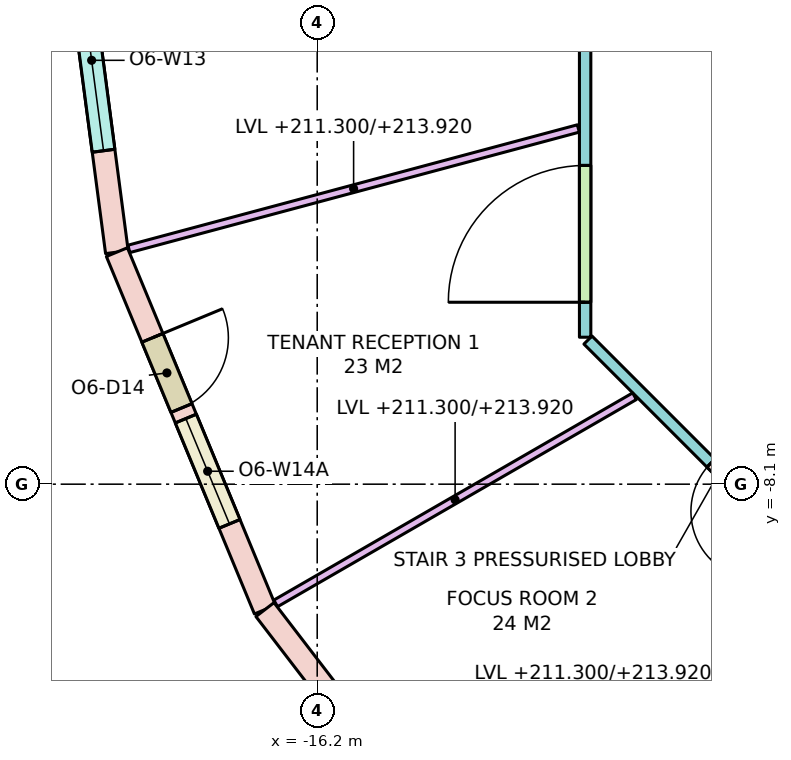
"""IFC4 building model, lengths in metres.
Left out: names, types, materials, properties, quantities, classifications, styles, units other than length and angle.
Written with IfcOpenShell. Run it as: python <this file> out.ifc"""

import sys

from ifc_helpers import new_model, si_unit, direction, frame, frame_2d, origin, place, context, subcontext, project, spatial, rectangle, extrude, element, fill, save


model = new_model("IFC4")
c1 = context("Model", 3, precision=1e-05, world=origin(), true_north=direction((0.0, 1.0)))
c2 = subcontext(c1, "Body", "Model", "MODEL_VIEW")
j1 = project(units=[si_unit("LENGTHUNIT", "METRE"), si_unit("PLANEANGLEUNIT", "RADIAN")], contexts=[c1])
p1 = place(None, origin())
s1 = spatial("IfcSite", under=j1, at=p1, CompositionType="ELEMENT")
p2 = place(p1, origin())
s2 = spatial("IfcBuilding", under=s1, at=p2, CompositionType="ELEMENT")
p3 = place(p2, frame((0.0, 0.0, 211.3)))
s3 = spatial("IfcBuildingStorey", under=s2, at=p3, CompositionType="ELEMENT", Elevation=211.3)
p4 = place(p3, frame((-19.5, 0.0, 0.0), z_axis=(0.0, 0.0, 1.0), x_axis=(0.130495451964, -0.99144890792, 0.0)))
e1 = element("IfcWall", 1, at=p4, inside=s3, PredefinedType="STANDARD", context=c2, shape_type="SweptSolid", body=[
    extrude(rectangle(XDim=5.091, YDim=0.3, at=frame_2d((2.545, 0.0))), origin(), (0.0, 0.0, 1.0), 3.42),
])
p5 = place(p4, frame((1.345, 0.0, 0.8)))
e2 = element("IfcOpeningElement", 2, at=p5, cuts=e1, PredefinedType="OPENING", context=c2, shape_type="SweptSolid", body=[
    extrude(rectangle(XDim=2.4, YDim=2.4, at=frame_2d((1.2, 1.2))), frame((0.0, 0.16, 0.0), z_axis=(0.0, -1.0, 0.0), x_axis=(1.0, 0.0, 0.0)), (0.0, 0.0, 1.0), 0.32),
])
p6 = place(p3, frame((-18.836, -5.047, 0.0), z_axis=(0.0, 0.0, 1.0), x_axis=(0.382724538613, -0.923862504675, 0.0)))
e3 = element("IfcWall", 3, at=p6, inside=s3, PredefinedType="STANDARD", context=c2, shape_type="SweptSolid", body=[
    extrude(rectangle(XDim=5.091, YDim=0.3, at=frame_2d((2.545, 0.0))), origin(), (0.0, 0.0, 1.0), 3.42),
])
p7 = place(p6, frame((1.22, 0.0, 0.0)))
e4 = element("IfcOpeningElement", 4, at=p7, cuts=e3, PredefinedType="OPENING", context=c2, shape_type="SweptSolid", body=[
    extrude(rectangle(XDim=1.0, YDim=2.4, at=frame_2d((0.5, 1.2))), frame((0.0, 0.16, 0.0), z_axis=(0.0, -1.0, 0.0), x_axis=(1.0, 0.0, 0.0)), (0.0, 0.0, 1.0), 0.32),
])
p8 = place(p6, frame((2.37, 0.0, 0.8)))
e5 = element("IfcOpeningElement", 5, at=p8, cuts=e3, PredefinedType="OPENING", context=c2, shape_type="SweptSolid", body=[
    extrude(rectangle(XDim=1.5, YDim=2.4, at=frame_2d((0.75, 1.2))), frame((0.0, 0.16, 0.0), z_axis=(0.0, -1.0, 0.0), x_axis=(1.0, 0.0, 0.0)), (0.0, 0.0, 1.0), 0.32),
])
p9 = place(p3, frame((-16.887, -9.75, 0.0), z_axis=(0.0, 0.0, 1.0), x_axis=(0.608757714995, -0.79335619014, 0.0)))
e6 = element("IfcWall", 6, at=p9, inside=s3, PredefinedType="STANDARD", context=c2, shape_type="SweptSolid", body=[
    extrude(rectangle(XDim=5.091, YDim=0.3, at=frame_2d((2.545, 0.0))), origin(), (0.0, 0.0, 1.0), 3.42),
])
p10 = place(p9, frame((1.345, 0.0, 0.8)))
e7 = element("IfcOpeningElement", 7, at=p10, cuts=e6, PredefinedType="OPENING", context=c2, shape_type="SweptSolid", body=[
    extrude(rectangle(XDim=2.4, YDim=2.4, at=frame_2d((1.2, 1.2))), frame((0.0, 0.16, 0.0), z_axis=(0.0, -1.0, 0.0), x_axis=(1.0, 0.0, 0.0)), (0.0, 0.0, 1.0), 0.32),
])
p11 = place(p3, frame((-9.421, -9.421, 0.0), z_axis=(0.0, 0.0, 1.0), x_axis=(-0.707079950597, 0.707133610758, 0.0)))
e8 = element("IfcWall", 8, at=p11, inside=s3, PredefinedType="PARTITIONING", context=c2, shape_type="SweptSolid", body=[
    extrude(rectangle(XDim=4.55, YDim=0.15, at=frame_2d((2.275, 0.0))), origin(), (0.0, 0.0, 1.0), 2.62),
])
p12 = place(p11, frame((1.361, 0.0, 0.0)))
e9 = element("IfcOpeningElement", 9, at=p12, cuts=e8, PredefinedType="OPENING", context=c2, shape_type="SweptSolid", body=[
    extrude(rectangle(XDim=0.9, YDim=2.1, at=frame_2d((0.45, 1.05))), frame((0.0, 0.085, 0.0), z_axis=(0.0, -1.0, 0.0), x_axis=(1.0, 0.0, 0.0)), (0.0, 0.0, 1.0), 0.17),
])
p13 = place(p3, frame((-12.675, -6.167, 0.0), z_axis=(0.0, 0.0, 1.0), x_axis=(0.0, 1.0, 0.0)))
e10 = element("IfcWall", 10, at=p13, inside=s3, PredefinedType="PARTITIONING", context=c2, shape_type="SweptSolid", body=[
    extrude(rectangle(XDim=12.333, YDim=0.15, at=frame_2d((6.167, 0.0))), origin(), (0.0, 0.0, 1.0), 2.62),
])
p14 = place(p13, frame((10.473, 0.0, 0.0)))
e11 = element("IfcOpeningElement", 11, at=p14, cuts=e10, PredefinedType="OPENING", context=c2, shape_type="SweptSolid", body=[
    extrude(rectangle(XDim=0.9, YDim=2.1, at=frame_2d((0.45, 1.05))), frame((0.0, 0.085, 0.0), z_axis=(0.0, -1.0, 0.0), x_axis=(1.0, 0.0, 0.0)), (0.0, 0.0, 1.0), 0.17),
])
p15 = place(p13, frame((7.416, 0.0, 0.0)))
e12 = element("IfcOpeningElement", 12, at=p15, cuts=e10, PredefinedType="OPENING", context=c2, shape_type="SweptSolid", body=[
    extrude(rectangle(XDim=0.9, YDim=2.1, at=frame_2d((0.45, 1.05))), frame((0.0, 0.085, 0.0), z_axis=(0.0, -1.0, 0.0), x_axis=(1.0, 0.0, 0.0)), (0.0, 0.0, 1.0), 0.17),
])
p16 = place(p13, frame((4.018, 0.0, 0.0)))
e13 = element("IfcOpeningElement", 13, at=p16, cuts=e10, PredefinedType="OPENING", context=c2, shape_type="SweptSolid", body=[
    extrude(rectangle(XDim=0.9, YDim=2.1, at=frame_2d((0.45, 1.05))), frame((0.0, 0.085, 0.0), z_axis=(0.0, -1.0, 0.0), x_axis=(1.0, 0.0, 0.0)), (0.0, 0.0, 1.0), 0.17),
])
p17 = place(p13, frame((0.46, 0.0, 0.0)))
e14 = element("IfcOpeningElement", 14, at=p17, cuts=e10, PredefinedType="OPENING", context=c2, shape_type="SweptSolid", body=[
    extrude(rectangle(XDim=1.8, YDim=2.1, at=frame_2d((0.9, 1.05))), frame((0.0, 0.085, 0.0), z_axis=(0.0, -1.0, 0.0), x_axis=(1.0, 0.0, 0.0)), (0.0, 0.0, 1.0), 0.17),
])
p18 = place(p3, frame((-12.764, -3.42, 0.0), z_axis=(0.0, 0.0, 1.0), x_axis=(-0.965925800266, -0.258819142221, 0.0)))
e15 = element("IfcWall", 15, at=p18, inside=s3, PredefinedType="PARTITIONING", context=c2, shape_type="SweptSolid", body=[
    extrude(rectangle(XDim=6.122, YDim=0.1, at=frame_2d((3.061, 0.0))), origin(), (0.0, 0.0, 1.0), 2.62),
])
p19 = place(p3, frame((-12.025, -6.943, 0.0), z_axis=(0.0, 0.0, 1.0), x_axis=(-0.866029712004, -0.499992537871, 0.0)))
e16 = element("IfcWall", 16, at=p19, inside=s3, PredefinedType="PARTITIONING", context=c2, shape_type="SweptSolid", body=[
    extrude(rectangle(XDim=5.451, YDim=0.1, at=frame_2d((2.726, 0.0))), origin(), (0.0, 0.0, 1.0), 2.62),
])
p20 = place(p3, frame((-9.491, -9.491, 0.0), z_axis=(0.0, 0.0, 1.0), x_axis=(-0.707106781187, -0.707106781187, 0.0)))
e17 = element("IfcWall", 17, at=p20, inside=s3, PredefinedType="PARTITIONING", context=c2, shape_type="SweptSolid", body=[
    extrude(rectangle(XDim=5.914, YDim=0.2, at=frame_2d((2.957, 0.0))), origin(), (0.0, 0.0, 1.0), 2.62),
])
p21 = place(p5, origin())
e18 = element("IfcWindow", 18, at=p21, inside=s3, PartitioningType="SINGLE_PANEL", PredefinedType="WINDOW", context=c2, shape_type="SweptSolid", body=[
    extrude(rectangle(XDim=2.4, YDim=2.4, at=frame_2d((1.2, 1.2))), frame((0.0, 0.03, 0.0), z_axis=(0.0, -1.0, 0.0), x_axis=(1.0, 0.0, 0.0)), (0.0, 0.0, 1.0), 0.06),
])
fill(e2, e18)
p22 = place(p7, origin())
e19 = element("IfcDoor", 19, at=p22, inside=s3, OperationType="SINGLE_SWING_LEFT", PredefinedType="DOOR", context=c2, shape_type="SweptSolid", body=[
    extrude(rectangle(XDim=1.0, YDim=2.4, at=frame_2d((0.5, 1.2))), frame((0.0, 0.025, 0.0), z_axis=(0.0, -1.0, 0.0), x_axis=(1.0, 0.0, 0.0)), (0.0, 0.0, 1.0), 0.05),
])
fill(e4, e19)
p23 = place(p8, origin())
e20 = element("IfcWindow", 20, at=p23, inside=s3, PartitioningType="SINGLE_PANEL", PredefinedType="WINDOW", context=c2, shape_type="SweptSolid", body=[
    extrude(rectangle(XDim=1.5, YDim=2.4, at=frame_2d((0.75, 1.2))), frame((0.0, 0.03, 0.0), z_axis=(0.0, -1.0, 0.0), x_axis=(1.0, 0.0, 0.0)), (0.0, 0.0, 1.0), 0.06),
])
fill(e5, e20)
p24 = place(p17, origin())
e21 = element("IfcDoor", 21, at=p24, inside=s3, OperationType="DOUBLE_DOOR_SINGLE_SWING", PredefinedType="DOOR", context=c2, shape_type="SweptSolid", body=[
    extrude(rectangle(XDim=1.8, YDim=2.1, at=frame_2d((0.9, 1.05))), frame((0.0, 0.025, 0.0), z_axis=(0.0, -1.0, 0.0), x_axis=(1.0, 0.0, 0.0)), (0.0, 0.0, 1.0), 0.05),
])
fill(e14, e21)
p25 = place(p12, origin())
e22 = element("IfcDoor", 22, at=p25, inside=s3, OperationType="SINGLE_SWING_LEFT", PredefinedType="DOOR", context=c2, shape_type="SweptSolid", body=[
    extrude(rectangle(XDim=0.9, YDim=2.1, at=frame_2d((0.45, 1.05))), frame((0.0, 0.025, 0.0), z_axis=(0.0, -1.0, 0.0), x_axis=(1.0, 0.0, 0.0)), (0.0, 0.0, 1.0), 0.05),
])
fill(e9, e22)
save(model, sys.argv[1])
